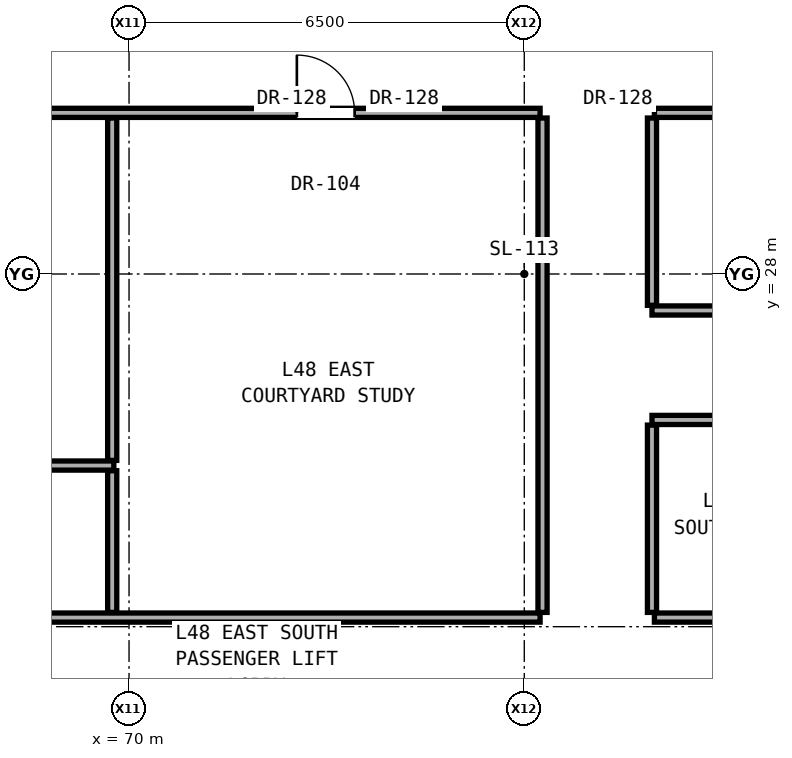
"""IFC4 building model, lengths in metres.
Left out: names, types, materials, properties, quantities, classifications, styles, units other than length and angle.
Written with IfcOpenShell. Run it as: python <this file> out.ifc"""

import sys

from ifc_helpers import new_model, si_unit, direction, frame, frame_2d, origin, place, context, subcontext, project, spatial, rectangle, extrude, element, fill, save


model = new_model("IFC4")
c1 = context("Model", 3, precision=1e-05, world=origin(), true_north=direction((0.0, 1.0)))
c2 = subcontext(c1, "Body", "Model", "MODEL_VIEW")
j1 = project(units=[si_unit("LENGTHUNIT", "METRE"), si_unit("PLANEANGLEUNIT", "RADIAN")], contexts=[c1])
p1 = place(None, origin())
s1 = spatial("IfcSite", under=j1, at=p1, CompositionType="ELEMENT")
p2 = place(p1, origin())
s2 = spatial("IfcBuilding", under=s1, at=p2, CompositionType="ELEMENT")
p3 = place(p2, frame((0.0, 0.0, 170.65)))
s3 = spatial("IfcBuildingStorey", under=s2, at=p3, CompositionType="ELEMENT", Elevation=170.65)
p4 = place(p3, frame((66.62, 22.35, 0.0), z_axis=(0.0, 0.0, 1.0), x_axis=(1.0, 0.0, 0.0)))
e1 = element("IfcWall", 1, at=p4, inside=s3, PredefinedType="PARTITIONING", context=c2, shape_type="SweptSolid", body=[
    extrude(rectangle(XDim=10.14, YDim=0.15, at=frame_2d((5.07, 0.0))), origin(), (0.0, 0.0, 1.0), 2.186),
])
p5 = place(p3, frame((78.64, 22.35, 0.0), z_axis=(0.0, 0.0, 1.0), x_axis=(1.0, 0.0, 0.0)))
e2 = element("IfcWall", 2, at=p5, inside=s3, PredefinedType="PARTITIONING", context=c2, shape_type="SweptSolid", body=[
    extrude(rectangle(XDim=7.61, YDim=0.15, at=frame_2d((3.805, 0.0))), origin(), (0.0, 0.0, 1.0), 2.186),
])
p6 = place(p5, frame((3.33, 0.0, 0.0)))
e3 = element("IfcOpeningElement", 3, at=p6, cuts=e2, PredefinedType="OPENING", context=c2, shape_type="SweptSolid", body=[
    extrude(rectangle(XDim=0.95, YDim=2.15, at=frame_2d((0.475, 1.075))), frame((0.0, 0.085, 0.0), z_axis=(0.0, -1.0, 0.0), x_axis=(1.0, 0.0, 0.0)), (0.0, 0.0, 1.0), 0.17),
])
p7 = place(p3, frame((66.62, 24.85, 0.0), z_axis=(0.0, 0.0, 1.0), x_axis=(1.0, 0.0, 0.0)))
e4 = element("IfcWall", 4, at=p7, inside=s3, PredefinedType="PARTITIONING", context=c2, shape_type="SweptSolid", body=[
    extrude(rectangle(XDim=3.13, YDim=0.15, at=frame_2d((1.565, 0.0))), origin(), (0.0, 0.0, 1.0), 2.186),
])
for number, where, z_axis, x_axis in (
    (5, (78.6, 25.6, 0.0), (0.0, 0.0, 1.0), (1.0, 0.0, 0.0)),
    (6, (78.6, 27.4, 0.0), (0.0, 0.0, 1.0), (1.0, 0.0, 0.0)),
):
    element("IfcWall", number, at=place(p3, frame(where, z_axis=z_axis, x_axis=x_axis)), inside=s3, PredefinedType="PARTITIONING", context=c2, shape_type="SweptSolid", body=[
        extrude(rectangle(XDim=7.65, YDim=0.15, at=frame_2d((3.825, 0.0))), origin(), (0.0, 0.0, 1.0), 2.186),
    ])
p8 = place(p3, frame((66.62, 30.65, 0.0), z_axis=(0.0, 0.0, 1.0), x_axis=(1.0, 0.0, 0.0)))
e7 = element("IfcWall", 7, at=p8, inside=s3, PredefinedType="PARTITIONING", context=c2, shape_type="SweptSolid", body=[
    extrude(rectangle(XDim=10.14, YDim=0.15, at=frame_2d((5.07, 0.0))), origin(), (0.0, 0.0, 1.0), 2.186),
])
p9 = place(p8, frame((6.14, 0.0, 0.0)))
e8 = element("IfcOpeningElement", 8, at=p9, cuts=e7, PredefinedType="OPENING", context=c2, shape_type="SweptSolid", body=[
    extrude(rectangle(XDim=0.95, YDim=2.15, at=frame_2d((0.475, 1.075))), frame((0.0, 0.085, 0.0), z_axis=(0.0, -1.0, 0.0), x_axis=(1.0, 0.0, 0.0)), (0.0, 0.0, 1.0), 0.17),
])
p10 = place(p3, frame((78.64, 30.65, 0.0), z_axis=(0.0, 0.0, 1.0), x_axis=(1.0, 0.0, 0.0)))
e9 = element("IfcWall", 9, at=p10, inside=s3, PredefinedType="PARTITIONING", context=c2, shape_type="SweptSolid", body=[
    extrude(rectangle(XDim=7.61, YDim=0.15, at=frame_2d((3.805, 0.0))), origin(), (0.0, 0.0, 1.0), 2.186),
])
p11 = place(p10, frame((3.33, 0.0, 0.0)))
e10 = element("IfcOpeningElement", 10, at=p11, cuts=e9, PredefinedType="OPENING", context=c2, shape_type="SweptSolid", body=[
    extrude(rectangle(XDim=0.95, YDim=2.15, at=frame_2d((0.475, 1.075))), frame((0.0, 0.085, 0.0), z_axis=(0.0, -1.0, 0.0), x_axis=(1.0, 0.0, 0.0)), (0.0, 0.0, 1.0), 0.17),
])
p12 = place(p3, frame((69.723, 22.435, 0.0), z_axis=(0.0, 0.0, 1.0), x_axis=(0.0, 1.0, 0.0)))
e11 = element("IfcWall", 11, at=p12, inside=s3, PredefinedType="PARTITIONING", context=c2, shape_type="SweptSolid", body=[
    extrude(rectangle(XDim=2.33, YDim=0.15, at=frame_2d((1.165, 0.0))), origin(), (0.0, 0.0, 1.0), 3.05),
])
p13 = place(p3, frame((69.723, 24.935, 0.0), z_axis=(0.0, 0.0, 1.0), x_axis=(0.0, 1.0, 0.0)))
e12 = element("IfcWall", 12, at=p13, inside=s3, PredefinedType="PARTITIONING", context=c2, shape_type="SweptSolid", body=[
    extrude(rectangle(XDim=5.63, YDim=0.15, at=frame_2d((2.815, 0.0))), origin(), (0.0, 0.0, 1.0), 2.186),
])
p14 = place(p3, frame((76.8, 22.435, 0.0), z_axis=(0.0, 0.0, 1.0), x_axis=(0.0, 1.0, 0.0)))
e13 = element("IfcWall", 13, at=p14, inside=s3, PredefinedType="PARTITIONING", context=c2, shape_type="SweptSolid", body=[
    extrude(rectangle(XDim=8.13, YDim=0.15, at=frame_2d((4.065, 0.0))), origin(), (0.0, 0.0, 1.0), 2.186),
])
p15 = place(p3, frame((78.6, 22.435, 0.0), z_axis=(0.0, 0.0, 1.0), x_axis=(0.0, 1.0, 0.0)))
e14 = element("IfcWall", 14, at=p15, inside=s3, PredefinedType="PARTITIONING", context=c2, shape_type="SweptSolid", body=[
    extrude(rectangle(XDim=3.08, YDim=0.15, at=frame_2d((1.54, 0.0))), origin(), (0.0, 0.0, 1.0), 3.05),
])
p16 = place(p3, frame((78.6, 27.485, 0.0), z_axis=(0.0, 0.0, 1.0), x_axis=(0.0, 1.0, 0.0)))
e15 = element("IfcWall", 15, at=p16, inside=s3, PredefinedType="PARTITIONING", context=c2, shape_type="SweptSolid", body=[
    extrude(rectangle(XDim=3.08, YDim=0.15, at=frame_2d((1.54, 0.0))), origin(), (0.0, 0.0, 1.0), 2.186),
])
p17 = place(p9, origin())
e16 = element("IfcDoor", 16, at=p17, inside=s3, OperationType="SINGLE_SWING_LEFT", PredefinedType="DOOR", context=c2, shape_type="SweptSolid", body=[
    extrude(rectangle(XDim=0.95, YDim=2.15, at=frame_2d((0.475, 1.075))), frame((0.0, 0.025, 0.0), z_axis=(0.0, -1.0, 0.0), x_axis=(1.0, 0.0, 0.0)), (0.0, 0.0, 1.0), 0.05),
])
fill(e8, e16)
save(model, sys.argv[1])
